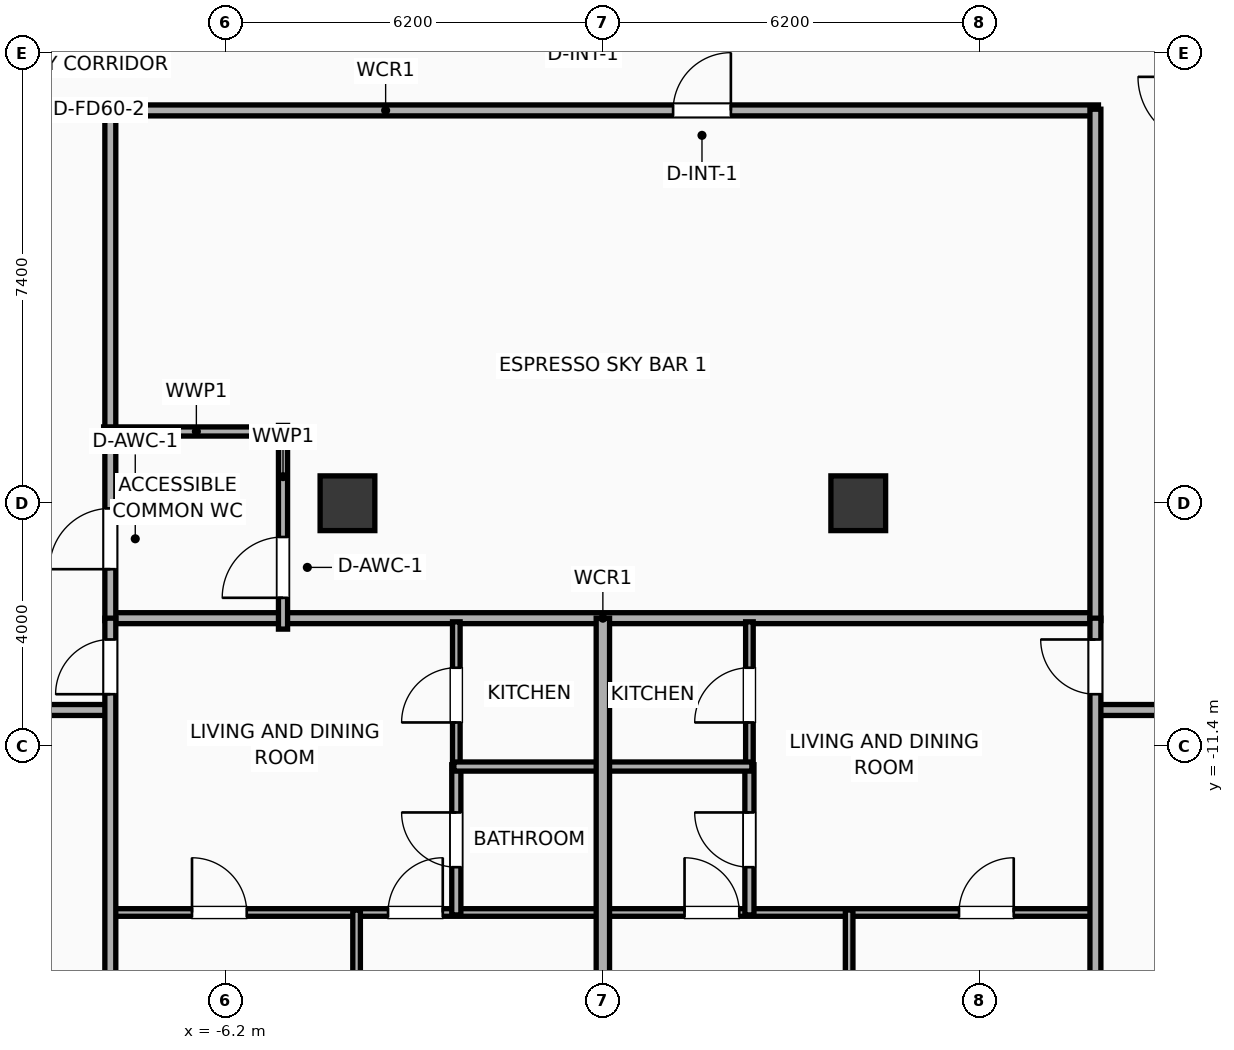
"""IFC4 building model, lengths in metres.
Left out: names, types, materials, properties, quantities, classifications, styles, units other than length and angle.
Written with IfcOpenShell. Run it as: python <this file> out.ifc"""

import sys

from ifc_helpers import new_model, si_unit, direction, frame, frame_2d, origin, origin_2d, place, context, subcontext, project, spatial, rectangle, extrude, element, fill, save


model = new_model("IFC4")
c1 = context("Model", 3, precision=1e-05, world=origin(), true_north=direction((0.0, 1.0)))
c2 = subcontext(c1, "Body", "Model", "MODEL_VIEW")
j1 = project(units=[si_unit("LENGTHUNIT", "METRE"), si_unit("PLANEANGLEUNIT", "RADIAN")], contexts=[c1])
p1 = place(None, origin())
s1 = spatial("IfcSite", under=j1, at=p1, CompositionType="ELEMENT")
p2 = place(p1, origin())
s2 = spatial("IfcBuilding", under=s1, at=p2, CompositionType="ELEMENT")
p3 = place(p2, frame((0.0, 0.0, 175.5)))
s3 = spatial("IfcBuildingStorey", under=s2, at=p3, CompositionType="ELEMENT", Elevation=175.5)
for number, where, z_axis, x_axis in (
    (1, (-4.2, -7.4, 0.0), (0.0, 0.0, 1.0), (1.0, 0.0, 0.0)),
    (2, (4.2, -7.4, 0.0), (0.0, 0.0, 1.0), (1.0, 0.0, 0.0)),
):
    element("IfcColumn", number, at=place(p3, frame(where, z_axis=z_axis, x_axis=x_axis)), inside=s3, PredefinedType="COLUMN", context=c2, shape_type="SweptSolid", body=[
        extrude(rectangle(XDim=0.9, YDim=0.9, at=origin_2d()), origin(), (0.0, 0.0, 1.0), 3.9),
    ])
p4 = place(p3, frame((-8.15, -9.29, 0.0), z_axis=(0.0, 0.0, 1.0), x_axis=(1.0, 0.0, 0.0)))
e3 = element("IfcWall", 3, at=p4, inside=s3, PredefinedType="PARTITIONING", context=c2, shape_type="SweptSolid", body=[
    extrude(rectangle(XDim=16.3, YDim=0.18, at=frame_2d((8.15, 0.0))), origin(), (0.0, 0.0, 1.0), 3.65),
])
p5 = place(p3, frame((-8.15, -0.94, 0.0), z_axis=(0.0, 0.0, 1.0), x_axis=(1.0, 0.0, 0.0)))
e4 = element("IfcWall", 4, at=p5, inside=s3, PredefinedType="PARTITIONING", context=c2, shape_type="SweptSolid", body=[
    extrude(rectangle(XDim=16.3, YDim=0.18, at=frame_2d((8.15, 0.0))), origin(), (0.0, 0.0, 1.0), 3.65),
])
p6 = place(p5, frame((9.305, 0.0, 0.0)))
e5 = element("IfcOpeningElement", 5, at=p6, cuts=e4, PredefinedType="OPENING", context=c2, shape_type="SweptSolid", body=[
    extrude(rectangle(XDim=0.95, YDim=2.05, at=frame_2d((0.475, 1.025))), frame((0.0, 0.1, 0.0), z_axis=(0.0, -1.0, 0.0), x_axis=(1.0, 0.0, 0.0)), (0.0, 0.0, 1.0), 0.2),
])
p7 = place(p3, frame((-8.1, -9.33, 0.0), z_axis=(0.0, 0.0, 1.0), x_axis=(0.0, 1.0, 0.0)))
e6 = element("IfcWall", 6, at=p7, inside=s3, PredefinedType="PARTITIONING", context=c2, shape_type="SweptSolid", body=[
    extrude(rectangle(XDim=8.41, YDim=0.18, at=frame_2d((4.205, 0.0))), origin(), (0.0, 0.0, 1.0), 3.65),
])
p8 = place(p7, frame((0.846, 0.0, 0.0)))
e7 = element("IfcOpeningElement", 7, at=p8, cuts=e6, PredefinedType="OPENING", context=c2, shape_type="SweptSolid", body=[
    extrude(rectangle(XDim=1.0, YDim=2.05, at=frame_2d((0.5, 1.025))), frame((0.0, 0.1, 0.0), z_axis=(0.0, -1.0, 0.0), x_axis=(1.0, 0.0, 0.0)), (0.0, 0.0, 1.0), 0.2),
])
p9 = place(p3, frame((8.1, -9.33, 0.0), z_axis=(0.0, 0.0, 1.0), x_axis=(0.0, 1.0, 0.0)))
e8 = element("IfcWall", 8, at=p9, inside=s3, PredefinedType="PARTITIONING", context=c2, shape_type="SweptSolid", body=[
    extrude(rectangle(XDim=8.41, YDim=0.18, at=frame_2d((4.205, 0.0))), origin(), (0.0, 0.0, 1.0), 3.65),
])
p10 = place(p3, frame((-5.26, -9.47, 0.0), z_axis=(0.0, 0.0, 1.0), x_axis=(0.0, 1.0, 0.0)))
e9 = element("IfcWall", 9, at=p10, inside=s3, PredefinedType="PLUMBINGWALL", context=c2, shape_type="SweptSolid", body=[
    extrude(rectangle(XDim=3.35, YDim=0.15, at=frame_2d((1.675, 0.0))), origin(), (0.0, 0.0, 1.0), 3.65),
])
p11 = place(p10, frame((0.515, 0.0, 0.0)))
e10 = element("IfcOpeningElement", 10, at=p11, cuts=e9, PredefinedType="OPENING", context=c2, shape_type="SweptSolid", body=[
    extrude(rectangle(XDim=1.0, YDim=2.05, at=frame_2d((0.5, 1.025))), frame((0.0, 0.085, 0.0), z_axis=(0.0, -1.0, 0.0), x_axis=(1.0, 0.0, 0.0)), (0.0, 0.0, 1.0), 0.17),
])
p12 = place(p3, frame((-8.21, -6.22, 0.0), z_axis=(0.0, 0.0, 1.0), x_axis=(1.0, 0.0, 0.0)))
e11 = element("IfcWall", 11, at=p12, inside=s3, PredefinedType="PLUMBINGWALL", context=c2, shape_type="SweptSolid", body=[
    extrude(rectangle(XDim=3.05, YDim=0.15, at=frame_2d((1.525, 0.0))), origin(), (0.0, 0.0, 1.0), 3.65),
])
p13 = place(p3, frame((-20.0, -10.8, 0.0), z_axis=(0.0, 0.0, 1.0), x_axis=(1.0, 0.0, 0.0)))
e12 = element("IfcWall", 12, at=p13, inside=s3, PredefinedType="PARTITIONING", context=c2, shape_type="SweptSolid", body=[
    extrude(rectangle(XDim=11.92, YDim=0.18, at=frame_2d((5.96, 0.0))), origin(), (0.0, 0.0, 1.0), 3.65),
])
p14 = place(p13, frame((2.705, 0.0, 0.0)))
e13 = element("IfcOpeningElement", 13, at=p14, cuts=e12, PredefinedType="OPENING", context=c2, shape_type="SweptSolid", body=[
    extrude(rectangle(XDim=0.9, YDim=2.05, at=frame_2d((0.45, 1.025))), frame((0.0, 0.1, 0.0), z_axis=(0.0, -1.0, 0.0), x_axis=(1.0, 0.0, 0.0)), (0.0, 0.0, 1.0), 0.2),
])
p15 = place(p13, frame((9.618, 0.0, 0.0)))
e14 = element("IfcOpeningElement", 14, at=p15, cuts=e12, PredefinedType="OPENING", context=c2, shape_type="SweptSolid", body=[
    extrude(rectangle(XDim=1.15, YDim=2.05, at=frame_2d((0.575, 1.025))), frame((0.0, 0.1, 0.0), z_axis=(0.0, -1.0, 0.0), x_axis=(1.0, 0.0, 0.0)), (0.0, 0.0, 1.0), 0.2),
])
p16 = place(p3, frame((8.08, -10.8, 0.0), z_axis=(0.0, 0.0, 1.0), x_axis=(1.0, 0.0, 0.0)))
e15 = element("IfcWall", 15, at=p16, inside=s3, PredefinedType="PARTITIONING", context=c2, shape_type="SweptSolid", body=[
    extrude(rectangle(XDim=11.92, YDim=0.18, at=frame_2d((5.96, 0.0))), origin(), (0.0, 0.0, 1.0), 3.65),
])
p17 = place(p16, frame((1.251, 0.0, 0.0)))
e16 = element("IfcOpeningElement", 16, at=p17, cuts=e15, PredefinedType="OPENING", context=c2, shape_type="SweptSolid", body=[
    extrude(rectangle(XDim=1.15, YDim=2.05, at=frame_2d((0.575, 1.025))), frame((0.0, 0.1, 0.0), z_axis=(0.0, -1.0, 0.0), x_axis=(1.0, 0.0, 0.0)), (0.0, 0.0, 1.0), 0.2),
])
p18 = place(p16, frame((7.244, 0.0, 0.0)))
e17 = element("IfcOpeningElement", 17, at=p18, cuts=e15, PredefinedType="OPENING", context=c2, shape_type="SweptSolid", body=[
    extrude(rectangle(XDim=1.15, YDim=2.05, at=frame_2d((0.575, 1.025))), frame((0.0, 0.1, 0.0), z_axis=(0.0, -1.0, 0.0), x_axis=(1.0, 0.0, 0.0)), (0.0, 0.0, 1.0), 0.2),
])
p19 = place(p3, frame((-8.08, -14.13, 0.0), z_axis=(0.0, 0.0, 1.0), x_axis=(1.0, 0.0, 0.0)))
e18 = element("IfcWall", 18, at=p19, inside=s3, PredefinedType="PARTITIONING", context=c2, shape_type="SweptSolid", body=[
    extrude(rectangle(XDim=8.06, YDim=0.125, at=frame_2d((4.03, 0.0))), origin(), (0.0, 0.0, 1.0), 3.65),
])
p20 = place(p19, frame((1.323, 0.0, 0.0)))
e19 = element("IfcOpeningElement", 19, at=p20, cuts=e18, PredefinedType="OPENING", context=c2, shape_type="SweptSolid", body=[
    extrude(rectangle(XDim=0.9, YDim=2.05, at=frame_2d((0.45, 1.025))), frame((0.0, 0.073, 0.0), z_axis=(0.0, -1.0, 0.0), x_axis=(1.0, 0.0, 0.0)), (0.0, 0.0, 1.0), 0.145),
])
p21 = place(p19, frame((4.547, 0.0, 0.0)))
e20 = element("IfcOpeningElement", 20, at=p21, cuts=e18, PredefinedType="OPENING", context=c2, shape_type="SweptSolid", body=[
    extrude(rectangle(XDim=0.9, YDim=2.05, at=frame_2d((0.45, 1.025))), frame((0.0, 0.073, 0.0), z_axis=(0.0, -1.0, 0.0), x_axis=(1.0, 0.0, 0.0)), (0.0, 0.0, 1.0), 0.145),
])
p22 = place(p3, frame((-2.41, -11.76, 0.0), z_axis=(0.0, 0.0, 1.0), x_axis=(0.0, 1.0, 0.0)))
e21 = element("IfcWall", 21, at=p22, inside=s3, PredefinedType="PARTITIONING", context=c2, shape_type="SweptSolid", body=[
    extrude(rectangle(XDim=2.41, YDim=0.125, at=frame_2d((1.205, 0.0))), origin(), (0.0, 0.0, 1.0), 3.65),
])
p23 = place(p22, frame((0.755, 0.0, 0.0)))
e22 = element("IfcOpeningElement", 22, at=p23, cuts=e21, PredefinedType="OPENING", context=c2, shape_type="SweptSolid", body=[
    extrude(rectangle(XDim=0.9, YDim=2.05, at=frame_2d((0.45, 1.025))), frame((0.0, 0.073, 0.0), z_axis=(0.0, -1.0, 0.0), x_axis=(1.0, 0.0, 0.0)), (0.0, 0.0, 1.0), 0.145),
])
p24 = place(p3, frame((-2.41, -14.17, 0.0), z_axis=(0.0, 0.0, 1.0), x_axis=(0.0, 1.0, 0.0)))
e23 = element("IfcWall", 23, at=p24, inside=s3, PredefinedType="PLUMBINGWALL", context=c2, shape_type="SweptSolid", body=[
    extrude(rectangle(XDim=2.47, YDim=0.15, at=frame_2d((1.235, 0.0))), origin(), (0.0, 0.0, 1.0), 3.65),
])
p25 = place(p24, frame((0.785, 0.0, 0.0)))
e24 = element("IfcOpeningElement", 24, at=p25, cuts=e23, PredefinedType="OPENING", context=c2, shape_type="SweptSolid", body=[
    extrude(rectangle(XDim=0.9, YDim=2.05, at=frame_2d((0.45, 1.025))), frame((0.0, 0.085, 0.0), z_axis=(0.0, -1.0, 0.0), x_axis=(1.0, 0.0, 0.0)), (0.0, 0.0, 1.0), 0.17),
])
p26 = place(p3, frame((-2.45, -11.73, 0.0), z_axis=(0.0, 0.0, 1.0), x_axis=(1.0, 0.0, 0.0)))
e25 = element("IfcWall", 25, at=p26, inside=s3, PredefinedType="PLUMBINGWALL", context=c2, shape_type="SweptSolid", body=[
    extrude(rectangle(XDim=2.43, YDim=0.15, at=frame_2d((1.215, 0.0))), origin(), (0.0, 0.0, 1.0), 3.65),
])
p27 = place(p3, frame((-4.05, -21.031, 0.0), z_axis=(0.0, 0.0, 1.0), x_axis=(0.0, 1.0, 0.0)))
e26 = element("IfcWall", 26, at=p27, inside=s3, PredefinedType="PARTITIONING", context=c2, shape_type="SweptSolid", body=[
    extrude(rectangle(XDim=6.941, YDim=0.125, at=frame_2d((3.47, 0.0))), origin(), (0.0, 0.0, 1.0), 3.65),
])
p28 = place(p3, frame((-8.1, -21.456, 0.0), z_axis=(0.0, 0.0, 1.0), x_axis=(0.0, 1.0, 0.0)))
e27 = element("IfcWall", 27, at=p28, inside=s3, PredefinedType="PARTITIONING", context=c2, shape_type="SweptSolid", body=[
    extrude(rectangle(XDim=12.166, YDim=0.18, at=frame_2d((6.083, 0.0))), origin(), (0.0, 0.0, 1.0), 3.65),
])
p29 = place(p28, frame((10.916, 0.0, 0.0)))
e28 = element("IfcOpeningElement", 28, at=p29, cuts=e27, PredefinedType="OPENING", context=c2, shape_type="SweptSolid", body=[
    extrude(rectangle(XDim=0.9, YDim=2.05, at=frame_2d((0.45, 1.025))), frame((0.0, 0.1, 0.0), z_axis=(0.0, -1.0, 0.0), x_axis=(1.0, 0.0, 0.0)), (0.0, 0.0, 1.0), 0.2),
])
p30 = place(p3, frame((0.02, -14.13, 0.0), z_axis=(0.0, 0.0, 1.0), x_axis=(1.0, 0.0, 0.0)))
e29 = element("IfcWall", 29, at=p30, inside=s3, PredefinedType="PARTITIONING", context=c2, shape_type="SweptSolid", body=[
    extrude(rectangle(XDim=8.06, YDim=0.125, at=frame_2d((4.03, 0.0))), origin(), (0.0, 0.0, 1.0), 3.65),
])
p31 = place(p30, frame((1.323, 0.0, 0.0)))
e30 = element("IfcOpeningElement", 30, at=p31, cuts=e29, PredefinedType="OPENING", context=c2, shape_type="SweptSolid", body=[
    extrude(rectangle(XDim=0.9, YDim=2.05, at=frame_2d((0.45, 1.025))), frame((0.0, 0.073, 0.0), z_axis=(0.0, -1.0, 0.0), x_axis=(1.0, 0.0, 0.0)), (0.0, 0.0, 1.0), 0.145),
])
p32 = place(p30, frame((5.837, 0.0, 0.0)))
e31 = element("IfcOpeningElement", 31, at=p32, cuts=e29, PredefinedType="OPENING", context=c2, shape_type="SweptSolid", body=[
    extrude(rectangle(XDim=0.9, YDim=2.05, at=frame_2d((0.45, 1.025))), frame((0.0, 0.073, 0.0), z_axis=(0.0, -1.0, 0.0), x_axis=(1.0, 0.0, 0.0)), (0.0, 0.0, 1.0), 0.145),
])
p33 = place(p3, frame((2.41, -11.76, 0.0), z_axis=(0.0, 0.0, 1.0), x_axis=(0.0, 1.0, 0.0)))
e32 = element("IfcWall", 32, at=p33, inside=s3, PredefinedType="PARTITIONING", context=c2, shape_type="SweptSolid", body=[
    extrude(rectangle(XDim=2.41, YDim=0.125, at=frame_2d((1.205, 0.0))), origin(), (0.0, 0.0, 1.0), 3.65),
])
p34 = place(p33, frame((0.755, 0.0, 0.0)))
e33 = element("IfcOpeningElement", 33, at=p34, cuts=e32, PredefinedType="OPENING", context=c2, shape_type="SweptSolid", body=[
    extrude(rectangle(XDim=0.9, YDim=2.05, at=frame_2d((0.45, 1.025))), frame((0.0, 0.073, 0.0), z_axis=(0.0, -1.0, 0.0), x_axis=(1.0, 0.0, 0.0)), (0.0, 0.0, 1.0), 0.145),
])
p35 = place(p3, frame((2.41, -14.17, 0.0), z_axis=(0.0, 0.0, 1.0), x_axis=(0.0, 1.0, 0.0)))
e34 = element("IfcWall", 34, at=p35, inside=s3, PredefinedType="PLUMBINGWALL", context=c2, shape_type="SweptSolid", body=[
    extrude(rectangle(XDim=2.47, YDim=0.15, at=frame_2d((1.235, 0.0))), origin(), (0.0, 0.0, 1.0), 3.65),
])
p36 = place(p35, frame((0.785, 0.0, 0.0)))
e35 = element("IfcOpeningElement", 35, at=p36, cuts=e34, PredefinedType="OPENING", context=c2, shape_type="SweptSolid", body=[
    extrude(rectangle(XDim=0.9, YDim=2.05, at=frame_2d((0.45, 1.025))), frame((0.0, 0.085, 0.0), z_axis=(0.0, -1.0, 0.0), x_axis=(1.0, 0.0, 0.0)), (0.0, 0.0, 1.0), 0.17),
])
p37 = place(p3, frame((0.02, -11.73, 0.0), z_axis=(0.0, 0.0, 1.0), x_axis=(1.0, 0.0, 0.0)))
e36 = element("IfcWall", 36, at=p37, inside=s3, PredefinedType="PLUMBINGWALL", context=c2, shape_type="SweptSolid", body=[
    extrude(rectangle(XDim=2.43, YDim=0.15, at=frame_2d((1.215, 0.0))), origin(), (0.0, 0.0, 1.0), 3.65),
])
p38 = place(p3, frame((4.05, -20.179, 0.0), z_axis=(0.0, 0.0, 1.0), x_axis=(0.0, 1.0, 0.0)))
e37 = element("IfcWall", 37, at=p38, inside=s3, PredefinedType="PARTITIONING", context=c2, shape_type="SweptSolid", body=[
    extrude(rectangle(XDim=6.089, YDim=0.125, at=frame_2d((3.045, 0.0))), origin(), (0.0, 0.0, 1.0), 3.04),
])
p39 = place(p3, frame((8.1, -19.754, 0.0), z_axis=(0.0, 0.0, 1.0), x_axis=(0.0, 1.0, 0.0)))
e38 = element("IfcWall", 38, at=p39, inside=s3, PredefinedType="PARTITIONING", context=c2, shape_type="SweptSolid", body=[
    extrude(rectangle(XDim=10.464, YDim=0.18, at=frame_2d((5.232, 0.0))), origin(), (0.0, 0.0, 1.0), 3.65),
])
p40 = place(p39, frame((9.213, 0.0, 0.0)))
e39 = element("IfcOpeningElement", 39, at=p40, cuts=e38, PredefinedType="OPENING", context=c2, shape_type="SweptSolid", body=[
    extrude(rectangle(XDim=0.9, YDim=2.05, at=frame_2d((0.45, 1.025))), frame((0.0, 0.1, 0.0), z_axis=(0.0, -1.0, 0.0), x_axis=(1.0, 0.0, 0.0)), (0.0, 0.0, 1.0), 0.2),
])
p41 = place(p3, frame((0.0, -20.605, 0.0), z_axis=(0.0, 0.0, 1.0), x_axis=(0.0, 1.0, 0.0)))
e40 = element("IfcWall", 40, at=p41, inside=s3, PredefinedType="PARTITIONING", context=c2, shape_type="SweptSolid", body=[
    extrude(rectangle(XDim=11.315, YDim=0.22, at=frame_2d((5.657, 0.0))), origin(), (0.0, 0.0, 1.0), 3.65),
])
p42 = place(p6, origin())
e41 = element("IfcDoor", 41, at=p42, inside=s3, OperationType="SINGLE_SWING_RIGHT", PredefinedType="DOOR", context=c2, shape_type="SweptSolid", body=[
    extrude(rectangle(XDim=0.95, YDim=2.05, at=frame_2d((0.475, 1.025))), frame((0.0, 0.025, 0.0), z_axis=(0.0, -1.0, 0.0), x_axis=(1.0, 0.0, 0.0)), (0.0, 0.0, 1.0), 0.05),
])
fill(e5, e41)
p43 = place(p8, origin())
e42 = element("IfcDoor", 42, at=p43, inside=s3, OperationType="SINGLE_SWING_LEFT", PredefinedType="DOOR", context=c2, shape_type="SweptSolid", body=[
    extrude(rectangle(XDim=1.0, YDim=2.05, at=frame_2d((0.5, 1.025))), frame((0.0, 0.025, 0.0), z_axis=(0.0, -1.0, 0.0), x_axis=(1.0, 0.0, 0.0)), (0.0, 0.0, 1.0), 0.05),
])
fill(e7, e42)
p44 = place(p11, origin())
e43 = element("IfcDoor", 43, at=p44, inside=s3, OperationType="SINGLE_SWING_LEFT", PredefinedType="DOOR", context=c2, shape_type="SweptSolid", body=[
    extrude(rectangle(XDim=1.0, YDim=2.05, at=frame_2d((0.5, 1.025))), frame((0.0, 0.025, 0.0), z_axis=(0.0, -1.0, 0.0), x_axis=(1.0, 0.0, 0.0)), (0.0, 0.0, 1.0), 0.05),
])
fill(e10, e43)
p45 = place(p20, origin())
e44 = element("IfcDoor", 44, at=p45, inside=s3, OperationType="SINGLE_SWING_LEFT", PredefinedType="DOOR", context=c2, shape_type="SweptSolid", body=[
    extrude(rectangle(XDim=0.9, YDim=2.05, at=frame_2d((0.45, 1.025))), frame((0.0, 0.025, 0.0), z_axis=(0.0, -1.0, 0.0), x_axis=(1.0, 0.0, 0.0)), (0.0, 0.0, 1.0), 0.05),
])
fill(e19, e44)
p46 = place(p21, origin())
e45 = element("IfcDoor", 45, at=p46, inside=s3, OperationType="SINGLE_SWING_RIGHT", PredefinedType="DOOR", context=c2, shape_type="SweptSolid", body=[
    extrude(rectangle(XDim=0.9, YDim=2.05, at=frame_2d((0.45, 1.025))), frame((0.0, 0.025, 0.0), z_axis=(0.0, -1.0, 0.0), x_axis=(1.0, 0.0, 0.0)), (0.0, 0.0, 1.0), 0.05),
])
fill(e20, e45)
p47 = place(p23, origin())
e46 = element("IfcDoor", 46, at=p47, inside=s3, OperationType="SINGLE_SWING_LEFT", PredefinedType="DOOR", context=c2, shape_type="SweptSolid", body=[
    extrude(rectangle(XDim=0.9, YDim=2.05, at=frame_2d((0.45, 1.025))), frame((0.0, 0.025, 0.0), z_axis=(0.0, -1.0, 0.0), x_axis=(1.0, 0.0, 0.0)), (0.0, 0.0, 1.0), 0.05),
])
fill(e22, e46)
p48 = place(p25, origin())
e47 = element("IfcDoor", 47, at=p48, inside=s3, OperationType="SINGLE_SWING_RIGHT", PredefinedType="DOOR", context=c2, shape_type="SweptSolid", body=[
    extrude(rectangle(XDim=0.9, YDim=2.05, at=frame_2d((0.45, 1.025))), frame((0.0, 0.025, 0.0), z_axis=(0.0, -1.0, 0.0), x_axis=(1.0, 0.0, 0.0)), (0.0, 0.0, 1.0), 0.05),
])
fill(e24, e47)
p49 = place(p29, origin())
e48 = element("IfcDoor", 48, at=p49, inside=s3, OperationType="SINGLE_SWING_LEFT", PredefinedType="DOOR", context=c2, shape_type="SweptSolid", body=[
    extrude(rectangle(XDim=0.9, YDim=2.05, at=frame_2d((0.45, 1.025))), frame((0.0, 0.025, 0.0), z_axis=(0.0, -1.0, 0.0), x_axis=(1.0, 0.0, 0.0)), (0.0, 0.0, 1.0), 0.05),
])
fill(e28, e48)
p50 = place(p31, origin())
e49 = element("IfcDoor", 49, at=p50, inside=s3, OperationType="SINGLE_SWING_LEFT", PredefinedType="DOOR", context=c2, shape_type="SweptSolid", body=[
    extrude(rectangle(XDim=0.9, YDim=2.05, at=frame_2d((0.45, 1.025))), frame((0.0, 0.025, 0.0), z_axis=(0.0, -1.0, 0.0), x_axis=(1.0, 0.0, 0.0)), (0.0, 0.0, 1.0), 0.05),
])
fill(e30, e49)
p51 = place(p32, origin())
e50 = element("IfcDoor", 50, at=p51, inside=s3, OperationType="SINGLE_SWING_RIGHT", PredefinedType="DOOR", context=c2, shape_type="SweptSolid", body=[
    extrude(rectangle(XDim=0.9, YDim=2.05, at=frame_2d((0.45, 1.025))), frame((0.0, 0.025, 0.0), z_axis=(0.0, -1.0, 0.0), x_axis=(1.0, 0.0, 0.0)), (0.0, 0.0, 1.0), 0.05),
])
fill(e31, e50)
p52 = place(p34, origin())
e51 = element("IfcDoor", 51, at=p52, inside=s3, OperationType="SINGLE_SWING_LEFT", PredefinedType="DOOR", context=c2, shape_type="SweptSolid", body=[
    extrude(rectangle(XDim=0.9, YDim=2.05, at=frame_2d((0.45, 1.025))), frame((0.0, 0.025, 0.0), z_axis=(0.0, -1.0, 0.0), x_axis=(1.0, 0.0, 0.0)), (0.0, 0.0, 1.0), 0.05),
])
fill(e33, e51)
p53 = place(p36, origin())
e52 = element("IfcDoor", 52, at=p53, inside=s3, OperationType="SINGLE_SWING_RIGHT", PredefinedType="DOOR", context=c2, shape_type="SweptSolid", body=[
    extrude(rectangle(XDim=0.9, YDim=2.05, at=frame_2d((0.45, 1.025))), frame((0.0, 0.025, 0.0), z_axis=(0.0, -1.0, 0.0), x_axis=(1.0, 0.0, 0.0)), (0.0, 0.0, 1.0), 0.05),
])
fill(e35, e52)
p54 = place(p40, origin())
e53 = element("IfcDoor", 53, at=p54, inside=s3, OperationType="SINGLE_SWING_RIGHT", PredefinedType="DOOR", context=c2, shape_type="SweptSolid", body=[
    extrude(rectangle(XDim=0.9, YDim=2.05, at=frame_2d((0.45, 1.025))), frame((0.0, 0.025, 0.0), z_axis=(0.0, -1.0, 0.0), x_axis=(1.0, 0.0, 0.0)), (0.0, 0.0, 1.0), 0.05),
])
fill(e39, e53)
save(model, sys.argv[1])
